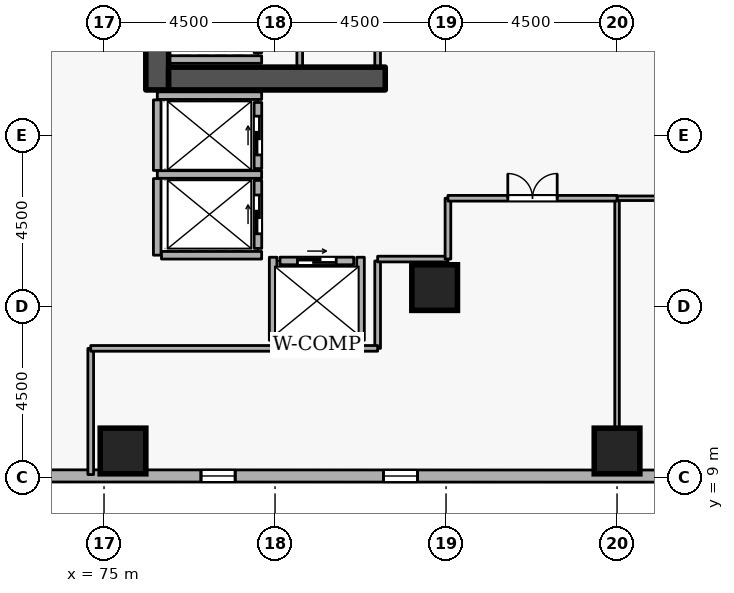
"""IFC4 building model, lengths in metres.
Left out: names, types, materials, properties, quantities, classifications, styles, units other than length and angle.
Written with IfcOpenShell. Run it as: python <this file> out.ifc"""

import sys

from ifc_helpers import new_model, si_unit, direction, frame, frame_2d, origin, origin_2d, place, context, subcontext, project, spatial, rectangle, extrude, element, fill, save


model = new_model("IFC4")
c1 = context("Model", 3, precision=1e-05, world=origin(), true_north=direction((0.0, 1.0)))
c2 = subcontext(c1, "Body", "Model", "MODEL_VIEW")
j1 = project(units=[si_unit("LENGTHUNIT", "METRE"), si_unit("PLANEANGLEUNIT", "RADIAN")], contexts=[c1])
p1 = place(None, origin())
s1 = spatial("IfcSite", under=j1, at=p1, CompositionType="ELEMENT")
p2 = place(p1, origin())
s2 = spatial("IfcBuilding", under=s1, at=p2, CompositionType="ELEMENT")
p3 = place(p2, frame((0.0, 0.0, 83.7)))
s3 = spatial("IfcBuildingStorey", under=s2, at=p3, CompositionType="ELEMENT", Elevation=83.7)
p4 = place(p3, frame((76.4, 19.2, 0.0), z_axis=(0.0, 0.0, 1.0), x_axis=(0.0, 1.0, 0.0)))
e1 = element("IfcWall", 1, at=p4, inside=s3, PredefinedType="SHEAR", context=c2, shape_type="SweptSolid", body=[
    extrude(rectangle(XDim=15.6, YDim=0.6, at=frame_2d((7.8, 0.0))), origin(), (0.0, 0.0, 1.0), 3.6),
])
p5 = place(p3, frame((76.7, 19.5, 0.0), z_axis=(0.0, 0.0, 1.0), x_axis=(1.0, 0.0, 0.0)))
e2 = element("IfcWall", 2, at=p5, inside=s3, PredefinedType="SHEAR", context=c2, shape_type="SweptSolid", body=[
    extrude(rectangle(XDim=5.7, YDim=0.6, at=frame_2d((2.85, 0.0))), origin(), (0.0, 0.0, 1.0), 3.6),
])
for number, where, z_axis, x_axis in (
    (3, (88.5, 9.7, 0.0), (0.0, 0.0, 1.0), (1.0, 0.0, 0.0)),
    (4, (75.5, 9.7, 0.0), (0.0, 0.0, 1.0), (1.0, 0.0, 0.0)),
    (5, (83.7, 14.0, 0.0), (0.0, 0.0, 1.0), (1.0, 0.0, 0.0)),
):
    element("IfcColumn", number, at=place(p3, frame(where, z_axis=z_axis, x_axis=x_axis)), inside=s3, PredefinedType="COLUMN", context=c2, shape_type="SweptSolid", body=[
        extrude(rectangle(XDim=1.2, YDim=1.2, at=origin_2d()), origin(), (0.0, 0.0, 1.0), 3.6),
    ])
p6 = place(p3, frame((70.052, 9.045, 0.0), z_axis=(0.0, 0.0, 1.0), x_axis=(0.999999960392, -0.000281454314, 0.0)))
e6 = element("IfcWall", 6, at=p6, inside=s3, PredefinedType="STANDARD", context=c2, shape_type="SweptSolid", body=[
    extrude(rectangle(XDim=33.83, YDim=0.32, at=frame_2d((16.915, 0.0))), origin(), (0.0, 0.0, 1.0), 2.7),
])
p7 = place(p6, frame((7.5, 0.0, 0.72)))
e7 = element("IfcOpeningElement", 7, at=p7, cuts=e6, PredefinedType="OPENING", context=c2, shape_type="SweptSolid", body=[
    extrude(rectangle(XDim=0.9, YDim=1.75, at=frame_2d((0.45, 0.875))), frame((0.0, 0.17, 0.0), z_axis=(0.0, -1.0, 0.0), x_axis=(1.0, 0.0, 0.0)), (0.0, 0.0, 1.0), 0.34),
])
p8 = place(p6, frame((12.3, 0.0, 0.72)))
e8 = element("IfcOpeningElement", 8, at=p8, cuts=e6, PredefinedType="OPENING", context=c2, shape_type="SweptSolid", body=[
    extrude(rectangle(XDim=0.9, YDim=1.75, at=frame_2d((0.45, 0.875))), frame((0.0, 0.17, 0.0), z_axis=(0.0, -1.0, 0.0), x_axis=(1.0, 0.0, 0.0)), (0.0, 0.0, 1.0), 0.34),
])
p9 = place(p6, frame((21.9, 0.0, 0.72)))
e9 = element("IfcOpeningElement", 9, at=p9, cuts=e6, PredefinedType="OPENING", context=c2, shape_type="SweptSolid", body=[
    extrude(rectangle(XDim=0.9, YDim=1.75, at=frame_2d((0.45, 0.875))), frame((0.0, 0.17, 0.0), z_axis=(0.0, -1.0, 0.0), x_axis=(1.0, 0.0, 0.0)), (0.0, 0.0, 1.0), 0.34),
])
p10 = place(p6, frame((26.7, 0.0, 0.72)))
e10 = element("IfcOpeningElement", 10, at=p10, cuts=e6, PredefinedType="OPENING", context=c2, shape_type="SweptSolid", body=[
    extrude(rectangle(XDim=0.9, YDim=1.75, at=frame_2d((0.45, 0.875))), frame((0.0, 0.17, 0.0), z_axis=(0.0, -1.0, 0.0), x_axis=(1.0, 0.0, 0.0)), (0.0, 0.0, 1.0), 0.34),
])
p11 = place(p3, frame((79.05, 20.18, 0.0), z_axis=(0.0, 0.0, 1.0), x_axis=(0.0, 1.0, 0.0)))
e11 = element("IfcWall", 11, at=p11, inside=s3, PredefinedType="STANDARD", context=c2, shape_type="SweptSolid", body=[
    extrude(rectangle(XDim=1.94, YDim=0.2, at=frame_2d((0.97, 0.0))), origin(), (0.0, 0.0, 1.0), 3.34),
])
p12 = place(p3, frame((79.05, 17.13, 0.0), z_axis=(0.0, 0.0, 1.0), x_axis=(0.0, 1.0, 0.0)))
e12 = element("IfcWall", 12, at=p12, inside=s3, PredefinedType="STANDARD", context=c2, shape_type="SweptSolid", body=[
    extrude(rectangle(XDim=1.74, YDim=0.2, at=frame_2d((0.87, 0.0))), origin(), (0.0, 0.0, 1.0), 3.34),
])
p13 = place(p12, frame((0.36, 0.0, 0.0)))
e13 = element("IfcOpeningElement", 13, at=p13, cuts=e12, PredefinedType="OPENING", context=c2, shape_type="SweptSolid", body=[
    extrude(rectangle(XDim=1.02, YDim=2.06, at=frame_2d((0.51, 1.03))), frame((0.0, 0.11, 0.0), z_axis=(0.0, -1.0, 0.0), x_axis=(1.0, 0.0, 0.0)), (0.0, 0.0, 1.0), 0.22),
])
p14 = place(p3, frame((79.05, 15.03, 0.0), z_axis=(0.0, 0.0, 1.0), x_axis=(0.0, 1.0, 0.0)))
e14 = element("IfcWall", 14, at=p14, inside=s3, PredefinedType="STANDARD", context=c2, shape_type="SweptSolid", body=[
    extrude(rectangle(XDim=1.79, YDim=0.2, at=frame_2d((0.895, 0.0))), origin(), (0.0, 0.0, 1.0), 3.34),
])
p15 = place(p14, frame((0.385, 0.0, 0.0)))
e15 = element("IfcOpeningElement", 15, at=p15, cuts=e14, PredefinedType="OPENING", context=c2, shape_type="SweptSolid", body=[
    extrude(rectangle(XDim=1.02, YDim=2.06, at=frame_2d((0.51, 1.03))), frame((0.0, 0.11, 0.0), z_axis=(0.0, -1.0, 0.0), x_axis=(1.0, 0.0, 0.0)), (0.0, 0.0, 1.0), 0.22),
])
p16 = place(p3, frame((79.63, 14.7, 0.0), z_axis=(0.0, 0.0, 1.0), x_axis=(1.0, 0.0, 0.0)))
e16 = element("IfcWall", 16, at=p16, inside=s3, PredefinedType="STANDARD", context=c2, shape_type="SweptSolid", body=[
    extrude(rectangle(XDim=1.94, YDim=0.2, at=frame_2d((0.97, 0.0))), origin(), (0.0, 0.0, 1.0), 3.34),
])
p17 = place(p16, frame((0.46, 0.0, 0.0)))
e17 = element("IfcOpeningElement", 17, at=p17, cuts=e16, PredefinedType="OPENING", context=c2, shape_type="SweptSolid", body=[
    extrude(rectangle(XDim=1.02, YDim=2.06, at=frame_2d((0.51, 1.03))), frame((0.0, 0.11, 0.0), z_axis=(0.0, -1.0, 0.0), x_axis=(1.0, 0.0, 0.0)), (0.0, 0.0, 1.0), 0.22),
])
p18 = place(p3, frame((76.712, 20.0, 0.0), z_axis=(0.0, 0.0, 1.0), x_axis=(1.0, 0.0, 0.0)))
e18 = element("IfcWall", 18, at=p18, inside=s3, PredefinedType="STANDARD", context=c2, shape_type="SweptSolid", body=[
    extrude(rectangle(XDim=2.436, YDim=0.2, at=frame_2d((1.218, 0.0))), origin(), (0.0, 0.0, 1.0), 3.34),
])
p19 = place(p3, frame((76.402, 19.05, 0.0), z_axis=(0.0, 0.0, 1.0), x_axis=(1.0, 0.0, 0.0)))
e19 = element("IfcWall", 19, at=p19, inside=s3, PredefinedType="STANDARD", context=c2, shape_type="SweptSolid", body=[
    extrude(rectangle(XDim=2.746, YDim=0.2, at=frame_2d((1.373, 0.0))), origin(), (0.0, 0.0, 1.0), 2.545),
])
p20 = place(p3, frame((76.402, 16.975, 0.0), z_axis=(0.0, 0.0, 1.0), x_axis=(1.0, 0.0, 0.0)))
e20 = element("IfcWall", 20, at=p20, inside=s3, PredefinedType="STANDARD", context=c2, shape_type="SweptSolid", body=[
    extrude(rectangle(XDim=2.746, YDim=0.2, at=frame_2d((1.373, 0.0))), origin(), (0.0, 0.0, 1.0), 3.34),
])
p21 = place(p3, frame((76.4, 14.852, 0.0), z_axis=(0.0, 0.0, 1.0), x_axis=(0.0, 1.0, 0.0)))
e21 = element("IfcWall", 21, at=p21, inside=s3, PredefinedType="STANDARD", context=c2, shape_type="SweptSolid", body=[
    extrude(rectangle(XDim=2.016, YDim=0.2, at=frame_2d((1.008, 0.0))), origin(), (0.0, 0.0, 1.0), 3.34),
])
p22 = place(p3, frame((76.4, 17.082, 0.0), z_axis=(0.0, 0.0, 1.0), x_axis=(0.0, 1.0, 0.0)))
e22 = element("IfcWall", 22, at=p22, inside=s3, PredefinedType="STANDARD", context=c2, shape_type="SweptSolid", body=[
    extrude(rectangle(XDim=1.856, YDim=0.2, at=frame_2d((0.928, 0.0))), origin(), (0.0, 0.0, 1.0), 3.34),
])
p23 = place(p3, frame((76.512, 14.85, 0.0), z_axis=(0.0, 0.0, 1.0), x_axis=(1.0, 0.0, 0.0)))
e23 = element("IfcWall", 23, at=p23, inside=s3, PredefinedType="STANDARD", context=c2, shape_type="SweptSolid", body=[
    extrude(rectangle(XDim=2.636, YDim=0.2, at=frame_2d((1.318, 0.0))), origin(), (0.0, 0.0, 1.0), 3.34),
])
p24 = place(p3, frame((79.452, 12.5, 0.0), z_axis=(0.0, 0.0, 1.0), x_axis=(1.0, 0.0, 0.0)))
e24 = element("IfcWall", 24, at=p24, inside=s3, PredefinedType="STANDARD", context=c2, shape_type="SweptSolid", body=[
    extrude(rectangle(XDim=2.296, YDim=0.2, at=frame_2d((1.148, 0.0))), origin(), (0.0, 0.0, 1.0), 3.34),
])
for number, where, z_axis, x_axis in (
    (25, (81.75, 12.612, 0.0), (0.0, 0.0, 1.0), (0.0, 1.0, 0.0)),
    (26, (79.45, 12.612, 0.0), (0.0, 0.0, 1.0), (0.0, 1.0, 0.0)),
):
    element("IfcWall", number, at=place(p3, frame(where, z_axis=z_axis, x_axis=x_axis)), inside=s3, PredefinedType="STANDARD", context=c2, shape_type="SweptSolid", body=[
        extrude(rectangle(XDim=2.186, YDim=0.2, at=frame_2d((1.093, 0.0))), origin(), (0.0, 0.0, 1.0), 3.34),
    ])
p25 = place(p3, frame((82.2, 19.8, 0.0), z_axis=(0.0, 0.0, 1.0), x_axis=(0.0, 1.0, 0.0)))
e27 = element("IfcWall", 27, at=p25, inside=s3, PredefinedType="PARTITIONING", context=c2, shape_type="SweptSolid", body=[
    extrude(rectangle(XDim=2.25, YDim=0.15, at=frame_2d((1.125, 0.0))), origin(), (0.0, 0.0, 1.0), 3.34),
])
p26 = place(p25, frame((0.665, 0.0, 0.0)))
e28 = element("IfcOpeningElement", 28, at=p26, cuts=e27, PredefinedType="OPENING", context=c2, shape_type="SweptSolid", body=[
    extrude(rectangle(XDim=0.92, YDim=2.08, at=frame_2d((0.46, 1.04))), frame((0.0, 0.085, 0.0), z_axis=(0.0, -1.0, 0.0), x_axis=(1.0, 0.0, 0.0)), (0.0, 0.0, 1.0), 0.17),
])
p27 = place(p3, frame((80.15, 22.05, 0.0), z_axis=(0.0, 0.0, 1.0), x_axis=(0.0, -1.0, 0.0)))
e29 = element("IfcWall", 29, at=p27, inside=s3, PredefinedType="PARTITIONING", context=c2, shape_type="SweptSolid", body=[
    extrude(rectangle(XDim=2.25, YDim=0.15, at=frame_2d((1.125, 0.0))), origin(), (0.0, 0.0, 1.0), 3.34),
])
p28 = place(p3, frame((88.5, 9.08, 0.0), z_axis=(0.0, 0.0, 1.0), x_axis=(0.0, 1.0, 0.0)))
e30 = element("IfcWall", 30, at=p28, inside=s3, PredefinedType="PARTITIONING", context=c2, shape_type="SweptSolid", body=[
    extrude(rectangle(XDim=7.27, YDim=0.12, at=frame_2d((3.635, 0.0))), origin(), (0.0, 0.0, 1.0), 2.882),
])
p29 = place(p3, frame((88.5, 16.35, 0.0), z_axis=(0.0, 0.0, 1.0), x_axis=(1.0, 0.0, 0.0)))
e31 = element("IfcWall", 31, at=p29, inside=s3, PredefinedType="PARTITIONING", context=c2, shape_type="SweptSolid", body=[
    extrude(rectangle(XDim=4.45, YDim=0.12, at=frame_2d((2.225, 0.0))), origin(), (0.0, 0.0, 1.0), 3.34),
])
p30 = place(p29, frame((1.7, 0.0, 0.0)))
e32 = element("IfcOpeningElement", 32, at=p30, cuts=e31, PredefinedType="OPENING", context=c2, shape_type="SweptSolid", body=[
    extrude(rectangle(XDim=1.05, YDim=2.1, at=frame_2d((0.525, 1.05))), frame((0.0, 0.07, 0.0), z_axis=(0.0, -1.0, 0.0), x_axis=(1.0, 0.0, 0.0)), (0.0, 0.0, 1.0), 0.14),
])
p31 = place(p3, frame((82.2, 12.4, 0.0), z_axis=(0.0, 0.0, 1.0), x_axis=(0.0, 1.0, 0.0)))
e33 = element("IfcWall", 33, at=p31, inside=s3, PredefinedType="PARTITIONING", context=c2, shape_type="SweptSolid", body=[
    extrude(rectangle(XDim=2.3, YDim=0.15, at=frame_2d((1.15, 0.0))), origin(), (0.0, 0.0, 1.0), 3.34),
])
p32 = place(p3, frame((82.2, 14.75, 0.0), z_axis=(0.0, 0.0, 1.0), x_axis=(1.0, 0.0, 0.0)))
e34 = element("IfcWall", 34, at=p32, inside=s3, PredefinedType="PARTITIONING", context=c2, shape_type="SweptSolid", body=[
    extrude(rectangle(XDim=1.85, YDim=0.15, at=frame_2d((0.925, 0.0))), origin(), (0.0, 0.0, 1.0), 3.34),
])
p33 = place(p3, frame((84.05, 14.75, 0.0), z_axis=(0.0, 0.0, 1.0), x_axis=(0.0, 1.0, 0.0)))
e35 = element("IfcWall", 35, at=p33, inside=s3, PredefinedType="PARTITIONING", context=c2, shape_type="SweptSolid", body=[
    extrude(rectangle(XDim=1.6, YDim=0.15, at=frame_2d((0.8, 0.0))), origin(), (0.0, 0.0, 1.0), 3.34),
])
p34 = place(p3, frame((84.05, 16.35, 0.0), z_axis=(0.0, 0.0, 1.0), x_axis=(1.0, 0.0, 0.0)))
e36 = element("IfcWall", 36, at=p34, inside=s3, PredefinedType="PARTITIONING", context=c2, shape_type="SweptSolid", body=[
    extrude(rectangle(XDim=4.45, YDim=0.15, at=frame_2d((2.225, 0.0))), origin(), (0.0, 0.0, 1.0), 3.34),
])
p35 = place(p34, frame((1.575, 0.0, 0.0)))
e37 = element("IfcOpeningElement", 37, at=p35, cuts=e36, PredefinedType="OPENING", context=c2, shape_type="SweptSolid", body=[
    extrude(rectangle(XDim=1.3, YDim=2.12, at=frame_2d((0.65, 1.06))), frame((0.0, 0.085, 0.0), z_axis=(0.0, -1.0, 0.0), x_axis=(1.0, 0.0, 0.0)), (0.0, 0.0, 1.0), 0.17),
])
p36 = place(p3, frame((74.65, 9.08, 0.0), z_axis=(0.0, 0.0, 1.0), x_axis=(0.0, 1.0, 0.0)))
e38 = element("IfcWall", 38, at=p36, inside=s3, PredefinedType="PARTITIONING", context=c2, shape_type="SweptSolid", body=[
    extrude(rectangle(XDim=3.32, YDim=0.15, at=frame_2d((1.66, 0.0))), origin(), (0.0, 0.0, 1.0), 3.34),
])
p37 = place(p3, frame((74.65, 12.4, 0.0), z_axis=(0.0, 0.0, 1.0), x_axis=(1.0, 0.0, 0.0)))
e39 = element("IfcWall", 39, at=p37, inside=s3, PredefinedType="PARTITIONING", context=c2, shape_type="SweptSolid", body=[
    extrude(rectangle(XDim=4.802, YDim=0.15, at=frame_2d((2.401, 0.0))), origin(), (0.0, 0.0, 1.0), 3.34),
])
p38 = place(p3, frame((81.748, 12.4, 0.0), z_axis=(0.0, 0.0, 1.0), x_axis=(1.0, 0.0, 0.0)))
e40 = element("IfcWall", 40, at=p38, inside=s3, PredefinedType="PARTITIONING", context=c2, shape_type="SweptSolid", body=[
    extrude(rectangle(XDim=0.452, YDim=0.15, at=frame_2d((0.226, 0.0))), origin(), (0.0, 0.0, 1.0), 3.34),
])
p39 = place(p7, origin())
e41 = element("IfcWindow", 41, at=p39, inside=s3, PartitioningType="SINGLE_PANEL", PredefinedType="WINDOW", context=c2, shape_type="SweptSolid", body=[
    extrude(rectangle(XDim=0.9, YDim=1.75, at=frame_2d((0.45, 0.875))), frame((0.0, 0.03, 0.0), z_axis=(0.0, -1.0, 0.0), x_axis=(1.0, 0.0, 0.0)), (0.0, 0.0, 1.0), 0.06),
])
fill(e7, e41)
p40 = place(p8, origin())
e42 = element("IfcWindow", 42, at=p40, inside=s3, PartitioningType="SINGLE_PANEL", PredefinedType="WINDOW", context=c2, shape_type="SweptSolid", body=[
    extrude(rectangle(XDim=0.9, YDim=1.75, at=frame_2d((0.45, 0.875))), frame((0.0, 0.03, 0.0), z_axis=(0.0, -1.0, 0.0), x_axis=(1.0, 0.0, 0.0)), (0.0, 0.0, 1.0), 0.06),
])
fill(e8, e42)
p41 = place(p13, origin())
e43 = element("IfcDoor", 43, at=p41, inside=s3, OperationType="SLIDING_TO_LEFT", PredefinedType="DOOR", context=c2, shape_type="SweptSolid", body=[
    extrude(rectangle(XDim=1.02, YDim=2.06, at=frame_2d((0.51, 1.03))), frame((0.0, 0.025, 0.0), z_axis=(0.0, -1.0, 0.0), x_axis=(1.0, 0.0, 0.0)), (0.0, 0.0, 1.0), 0.05),
])
fill(e13, e43)
p42 = place(p15, origin())
e44 = element("IfcDoor", 44, at=p42, inside=s3, OperationType="SLIDING_TO_LEFT", PredefinedType="DOOR", context=c2, shape_type="SweptSolid", body=[
    extrude(rectangle(XDim=1.02, YDim=2.06, at=frame_2d((0.51, 1.03))), frame((0.0, 0.025, 0.0), z_axis=(0.0, -1.0, 0.0), x_axis=(1.0, 0.0, 0.0)), (0.0, 0.0, 1.0), 0.05),
])
fill(e15, e44)
p43 = place(p17, origin())
e45 = element("IfcDoor", 45, at=p43, inside=s3, OperationType="SLIDING_TO_LEFT", PredefinedType="DOOR", context=c2, shape_type="SweptSolid", body=[
    extrude(rectangle(XDim=1.02, YDim=2.06, at=frame_2d((0.51, 1.03))), frame((0.0, 0.025, 0.0), z_axis=(0.0, -1.0, 0.0), x_axis=(1.0, 0.0, 0.0)), (0.0, 0.0, 1.0), 0.05),
])
fill(e17, e45)
p44 = place(p35, origin())
e46 = element("IfcDoor", 46, at=p44, inside=s3, OperationType="DOUBLE_DOOR_SINGLE_SWING", PredefinedType="DOOR", context=c2, shape_type="SweptSolid", body=[
    extrude(rectangle(XDim=1.3, YDim=2.12, at=frame_2d((0.65, 1.06))), frame((0.0, 0.025, 0.0), z_axis=(0.0, -1.0, 0.0), x_axis=(1.0, 0.0, 0.0)), (0.0, 0.0, 1.0), 0.05),
])
fill(e37, e46)
save(model, sys.argv[1])
